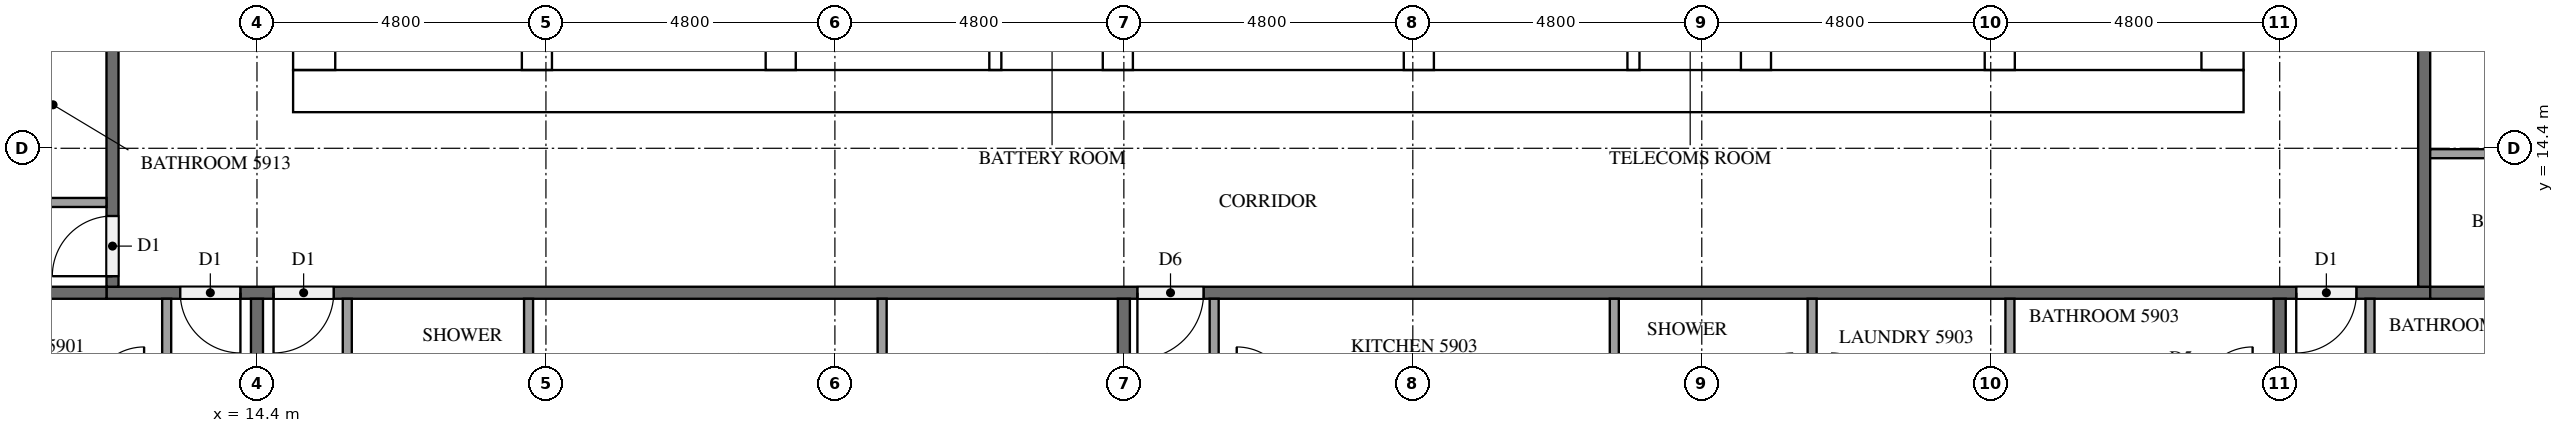
"""IFC4 building model, lengths in metres.
Left out: names, types, materials, properties, quantities, classifications, styles, units other than length and angle.
Written with IfcOpenShell. Run it as: python <this file> out.ifc"""

import sys

from ifc_helpers import new_model, si_unit, direction, frame, frame_2d, origin, place, context, subcontext, project, spatial, rectangle, extrude, element, fill, save


model = new_model("IFC4")
c1 = context("Model", 3, precision=1e-05, world=origin(), true_north=direction((0.0, 1.0)))
c2 = subcontext(c1, "Body", "Model", "MODEL_VIEW")
j1 = project(units=[si_unit("LENGTHUNIT", "METRE"), si_unit("PLANEANGLEUNIT", "RADIAN")], contexts=[c1])
p1 = place(None, origin())
s1 = spatial("IfcSite", under=j1, at=p1, CompositionType="ELEMENT")
p2 = place(p1, origin())
s2 = spatial("IfcBuilding", under=s1, at=p2, CompositionType="ELEMENT")
p3 = place(p2, frame((0.0, 0.0, 226.3)))
s3 = spatial("IfcBuildingStorey", under=s2, at=p3, CompositionType="ELEMENT", Elevation=226.3)
p4 = place(p3, frame((15.0, 15.35, 0.0), z_axis=(0.0, 0.0, 1.0), x_axis=(1.0, 0.0, 0.0)))
e1 = element("IfcWall", 1, at=p4, inside=s3, PredefinedType="SHEAR", context=c2, shape_type="SweptSolid", body=[
    extrude(rectangle(XDim=32.4, YDim=0.7, at=frame_2d((16.2, 0.0))), origin(), (0.0, 0.0, 1.0), 3.2),
])
p5 = place(p4, frame((15.3, 0.0, 0.0)))
e2 = element("IfcOpeningElement", 2, at=p5, cuts=e1, PredefinedType="OPENING", context=c2, shape_type="SweptSolid", body=[
    extrude(rectangle(XDim=1.8, YDim=2.1, at=frame_2d((0.9, 1.05))), frame((0.0, 0.36, 0.0), z_axis=(0.0, -1.0, 0.0), x_axis=(1.0, 0.0, 0.0)), (0.0, 0.0, 1.0), 0.72),
])
p6 = place(p3, frame((15.35, 15.7, 0.0), z_axis=(0.0, 0.0, 1.0), x_axis=(0.0, 1.0, 0.0)))
e3 = element("IfcWall", 3, at=p6, inside=s3, PredefinedType="SHEAR", context=c2, shape_type="SweptSolid", body=[
    extrude(rectangle(XDim=21.4, YDim=0.7, at=frame_2d((10.7, 0.0))), origin(), (0.0, 0.0, 1.0), 3.2),
])
p7 = place(p6, frame((5.06, 0.0, 0.0)))
e4 = element("IfcOpeningElement", 4, at=p7, cuts=e3, PredefinedType="OPENING", context=c2, shape_type="SweptSolid", body=[
    extrude(rectangle(XDim=1.2, YDim=2.1, at=frame_2d((0.6, 1.05))), frame((0.0, 0.36, 0.0), z_axis=(0.0, -1.0, 0.0), x_axis=(1.0, 0.0, 0.0)), (0.0, 0.0, 1.0), 0.72),
])
p8 = place(p3, frame((47.05, 15.7, 0.0), z_axis=(0.0, 0.0, 1.0), x_axis=(0.0, 1.0, 0.0)))
e5 = element("IfcWall", 5, at=p8, inside=s3, PredefinedType="SHEAR", context=c2, shape_type="SweptSolid", body=[
    extrude(rectangle(XDim=21.4, YDim=0.7, at=frame_2d((10.7, 0.0))), origin(), (0.0, 0.0, 1.0), 3.2),
])
p9 = place(p8, frame((10.4, 0.0, 0.0)))
e6 = element("IfcOpeningElement", 6, at=p9, cuts=e5, PredefinedType="OPENING", context=c2, shape_type="SweptSolid", body=[
    extrude(rectangle(XDim=1.2, YDim=2.1, at=frame_2d((0.6, 1.05))), frame((0.0, 0.36, 0.0), z_axis=(0.0, -1.0, 0.0), x_axis=(1.0, 0.0, 0.0)), (0.0, 0.0, 1.0), 0.72),
])
p10 = place(p3, frame((19.05, 15.7, 0.0), z_axis=(0.0, 0.0, 1.0), x_axis=(0.0, 1.0, 0.0)))
e7 = element("IfcWall", 7, at=p10, inside=s3, PredefinedType="SHEAR", context=c2, shape_type="SweptSolid", body=[
    extrude(rectangle(XDim=15.3, YDim=0.5, at=frame_2d((7.65, 0.0))), origin(), (0.0, 0.0, 1.0), 3.2),
])
p11 = place(p10, frame((9.75, 0.0, 0.0)))
e8 = element("IfcOpeningElement", 8, at=p11, cuts=e7, PredefinedType="OPENING", context=c2, shape_type="SweptSolid", body=[
    extrude(rectangle(XDim=1.1, YDim=2.1, at=frame_2d((0.55, 1.05))), frame((0.0, 0.26, 0.0), z_axis=(0.0, -1.0, 0.0), x_axis=(1.0, 0.0, 0.0)), (0.0, 0.0, 1.0), 0.52),
])
p12 = place(p10, frame((13.25, 0.0, 0.0)))
e9 = element("IfcOpeningElement", 9, at=p12, cuts=e7, PredefinedType="OPENING", context=c2, shape_type="SweptSolid", body=[
    extrude(rectangle(XDim=1.1, YDim=2.1, at=frame_2d((0.55, 1.05))), frame((0.0, 0.26, 0.0), z_axis=(0.0, -1.0, 0.0), x_axis=(1.0, 0.0, 0.0)), (0.0, 0.0, 1.0), 0.52),
])
p13 = place(p10, frame((0.5, 0.0, 0.0)))
e10 = element("IfcOpeningElement", 10, at=p13, cuts=e7, PredefinedType="OPENING", context=c2, shape_type="SweptSolid", body=[
    extrude(rectangle(XDim=1.2, YDim=2.1, at=frame_2d((0.6, 1.05))), frame((0.0, 0.26, 0.0), z_axis=(0.0, -1.0, 0.0), x_axis=(1.0, 0.0, 0.0)), (0.0, 0.0, 1.0), 0.52),
])
p14 = place(p3, frame((23.1, 15.7, 0.0), z_axis=(0.0, 0.0, 1.0), x_axis=(0.0, 1.0, 0.0)))
e11 = element("IfcWall", 11, at=p14, inside=s3, PredefinedType="SHEAR", context=c2, shape_type="SweptSolid", body=[
    extrude(rectangle(XDim=21.4, YDim=0.5, at=frame_2d((10.7, 0.0))), origin(), (0.0, 0.0, 1.0), 3.2),
])
p15 = place(p3, frame((39.3, 15.7, 0.0), z_axis=(0.0, 0.0, 1.0), x_axis=(0.0, 1.0, 0.0)))
e12 = element("IfcWall", 12, at=p15, inside=s3, PredefinedType="SHEAR", context=c2, shape_type="SweptSolid", body=[
    extrude(rectangle(XDim=8.55, YDim=0.5, at=frame_2d((4.275, 0.0))), origin(), (0.0, 0.0, 1.0), 3.2),
])
p16 = place(p3, frame((43.35, 15.7, 0.0), z_axis=(0.0, 0.0, 1.0), x_axis=(0.0, 1.0, 0.0)))
e13 = element("IfcWall", 13, at=p16, inside=s3, PredefinedType="SHEAR", context=c2, shape_type="SweptSolid", body=[
    extrude(rectangle(XDim=8.55, YDim=0.5, at=frame_2d((4.275, 0.0))), origin(), (0.0, 0.0, 1.0), 3.2),
])
p17 = place(p16, frame((0.5, 0.0, 0.0)))
e14 = element("IfcOpeningElement", 14, at=p17, cuts=e13, PredefinedType="OPENING", context=c2, shape_type="SweptSolid", body=[
    extrude(rectangle(XDim=1.2, YDim=2.1, at=frame_2d((0.6, 1.05))), frame((0.0, 0.26, 0.0), z_axis=(0.0, -1.0, 0.0), x_axis=(1.0, 0.0, 0.0)), (0.0, 0.0, 1.0), 0.52),
])
for number, where, z_axis, x_axis in (
    (15, (28.7, 15.7, 0.0), (0.0, 0.0, 1.0), (0.0, 1.0, 0.0)),
    (16, (33.7, 15.7, 0.0), (0.0, 0.0, 1.0), (0.0, 1.0, 0.0)),
):
    element("IfcWall", number, at=place(p3, frame(where, z_axis=z_axis, x_axis=x_axis)), inside=s3, PredefinedType="SHEAR", context=c2, shape_type="SweptSolid", body=[
        extrude(rectangle(XDim=2.8, YDim=0.5, at=frame_2d((1.4, 0.0))), origin(), (0.0, 0.0, 1.0), 3.2),
    ])
for number, where, z_axis, x_axis in (
    (17, (26.665, 15.7, 0.0), (0.0, 0.0, 1.0), (0.0, 1.0, 0.0)),
    (18, (37.265, 15.7, 0.0), (0.0, 0.0, 1.0), (0.0, 1.0, 0.0)),
):
    element("IfcWall", number, at=place(p3, frame(where, z_axis=z_axis, x_axis=x_axis)), inside=s3, PredefinedType="PARTITIONING", context=c2, shape_type="SweptSolid", body=[
        extrude(rectangle(XDim=2.8, YDim=0.2, at=frame_2d((1.4, 0.0))), origin(), (0.0, 0.0, 1.0), 3.2),
    ])
p18 = place(p3, frame((50.5, 12.0, 0.0), z_axis=(0.0, 0.0, 1.0), x_axis=(-1.0, 0.0, 0.0)))
e19 = element("IfcWall", 19, at=p18, inside=s3, PredefinedType="PARTITIONING", context=c2, shape_type="SweptSolid", body=[
    extrude(rectangle(XDim=38.6, YDim=0.2, at=frame_2d((19.3, 0.0))), origin(), (0.0, 0.0, 1.0), 3.2),
])
p19 = place(p18, frame((36.375, 0.0, 0.0)))
e20 = element("IfcOpeningElement", 20, at=p19, cuts=e19, PredefinedType="OPENING", context=c2, shape_type="SweptSolid", body=[
    extrude(rectangle(XDim=1.0, YDim=2.1, at=frame_2d((0.5, 1.05))), frame((0.0, 0.11, 0.0), z_axis=(0.0, -1.0, 0.0), x_axis=(1.0, 0.0, 0.0)), (0.0, 0.0, 1.0), 0.22),
])
p20 = place(p18, frame((34.825, 0.0, 0.0)))
e21 = element("IfcOpeningElement", 21, at=p20, cuts=e19, PredefinedType="OPENING", context=c2, shape_type="SweptSolid", body=[
    extrude(rectangle(XDim=1.0, YDim=2.1, at=frame_2d((0.5, 1.05))), frame((0.0, 0.11, 0.0), z_axis=(0.0, -1.0, 0.0), x_axis=(1.0, 0.0, 0.0)), (0.0, 0.0, 1.0), 0.22),
])
p21 = place(p18, frame((20.375, 0.0, 0.0)))
e22 = element("IfcOpeningElement", 22, at=p21, cuts=e19, PredefinedType="OPENING", context=c2, shape_type="SweptSolid", body=[
    extrude(rectangle(XDim=1.1, YDim=2.1, at=frame_2d((0.55, 1.05))), frame((0.0, 0.11, 0.0), z_axis=(0.0, -1.0, 0.0), x_axis=(1.0, 0.0, 0.0)), (0.0, 0.0, 1.0), 0.22),
])
p22 = place(p18, frame((1.225, 0.0, 0.0)))
e23 = element("IfcOpeningElement", 23, at=p22, cuts=e19, PredefinedType="OPENING", context=c2, shape_type="SweptSolid", body=[
    extrude(rectangle(XDim=1.0, YDim=2.1, at=frame_2d((0.5, 1.05))), frame((0.0, 0.11, 0.0), z_axis=(0.0, -1.0, 0.0), x_axis=(1.0, 0.0, 0.0)), (0.0, 0.0, 1.0), 0.22),
])
p23 = place(p3, frame((50.4, 40.7, 0.0), z_axis=(0.0, 0.0, 1.0), x_axis=(0.0, -1.0, 0.0)))
e24 = element("IfcWall", 24, at=p23, inside=s3, PredefinedType="PARTITIONING", context=c2, shape_type="SweptSolid", body=[
    extrude(rectangle(XDim=28.6, YDim=0.2, at=frame_2d((14.3, 0.0))), origin(), (0.0, 0.0, 1.0), 3.2),
])
p24 = place(p23, frame((21.775, 0.0, 0.0)))
e25 = element("IfcOpeningElement", 25, at=p24, cuts=e24, PredefinedType="OPENING", context=c2, shape_type="SweptSolid", body=[
    extrude(rectangle(XDim=1.0, YDim=2.1, at=frame_2d((0.5, 1.05))), frame((0.0, 0.11, 0.0), z_axis=(0.0, -1.0, 0.0), x_axis=(1.0, 0.0, 0.0)), (0.0, 0.0, 1.0), 0.22),
])
p25 = place(p23, frame((7.375, 0.0, 0.0)))
e26 = element("IfcOpeningElement", 26, at=p25, cuts=e24, PredefinedType="OPENING", context=c2, shape_type="SweptSolid", body=[
    extrude(rectangle(XDim=1.0, YDim=2.1, at=frame_2d((0.5, 1.05))), frame((0.0, 0.11, 0.0), z_axis=(0.0, -1.0, 0.0), x_axis=(1.0, 0.0, 0.0)), (0.0, 0.0, 1.0), 0.22),
])
p26 = place(p23, frame((0.175, 0.0, 0.0)))
e27 = element("IfcOpeningElement", 27, at=p26, cuts=e24, PredefinedType="OPENING", context=c2, shape_type="SweptSolid", body=[
    extrude(rectangle(XDim=1.0, YDim=2.1, at=frame_2d((0.5, 1.05))), frame((0.0, 0.11, 0.0), z_axis=(0.0, -1.0, 0.0), x_axis=(1.0, 0.0, 0.0)), (0.0, 0.0, 1.0), 0.22),
])
p27 = place(p3, frame((12.0, 12.1, 0.0), z_axis=(0.0, 0.0, 1.0), x_axis=(0.0, 1.0, 0.0)))
e28 = element("IfcWall", 28, at=p27, inside=s3, PredefinedType="PARTITIONING", context=c2, shape_type="SweptSolid", body=[
    extrude(rectangle(XDim=28.6, YDim=0.2, at=frame_2d((14.3, 0.0))), origin(), (0.0, 0.0, 1.0), 3.2),
])
p28 = place(p27, frame((9.725, 0.0, 0.0)))
e29 = element("IfcOpeningElement", 29, at=p28, cuts=e28, PredefinedType="OPENING", context=c2, shape_type="SweptSolid", body=[
    extrude(rectangle(XDim=1.1, YDim=2.1, at=frame_2d((0.55, 1.05))), frame((0.0, 0.11, 0.0), z_axis=(0.0, -1.0, 0.0), x_axis=(1.0, 0.0, 0.0)), (0.0, 0.0, 1.0), 0.22),
])
p29 = place(p27, frame((0.175, 0.0, 0.0)))
e30 = element("IfcOpeningElement", 30, at=p29, cuts=e28, PredefinedType="OPENING", context=c2, shape_type="SweptSolid", body=[
    extrude(rectangle(XDim=1.0, YDim=2.1, at=frame_2d((0.5, 1.05))), frame((0.0, 0.11, 0.0), z_axis=(0.0, -1.0, 0.0), x_axis=(1.0, 0.0, 0.0)), (0.0, 0.0, 1.0), 0.22),
])
for number, where, z_axis, x_axis in (
    (31, (14.4, 11.9, 0.0), (0.0, 0.0, 1.0), (0.0, -1.0, 0.0)),
    (32, (4.9, 12.0, 0.0), (0.0, 0.0, 1.0), (1.0, 0.0, 0.0)),
):
    element("IfcWall", number, at=place(p3, frame(where, z_axis=z_axis, x_axis=x_axis)), inside=s3, PredefinedType="PARTITIONING", context=c2, shape_type="SweptSolid", body=[
        extrude(rectangle(XDim=7.0, YDim=0.2, at=frame_2d((3.5, 0.0))), origin(), (0.0, 0.0, 1.0), 3.2),
    ])
for number, where, z_axis, x_axis in (
    (33, (28.8, 11.9, 0.0), (0.0, 0.0, 1.0), (0.0, -1.0, 0.0)),
    (34, (48.0, 11.9, 0.0), (0.0, 0.0, 1.0), (0.0, -1.0, 0.0)),
):
    element("IfcWall", number, at=place(p3, frame(where, z_axis=z_axis, x_axis=x_axis)), inside=s3, PredefinedType="PARTITIONING", context=c2, shape_type="SweptSolid", body=[
        extrude(rectangle(XDim=6.775, YDim=0.2, at=frame_2d((3.387, 0.0))), origin(), (0.0, 0.0, 1.0), 3.2),
    ])
p30 = place(p3, frame((50.5, 12.0, 0.0), z_axis=(0.0, 0.0, 1.0), x_axis=(1.0, 0.0, 0.0)))
e35 = element("IfcWall", 35, at=p30, inside=s3, PredefinedType="PARTITIONING", context=c2, shape_type="SweptSolid", body=[
    extrude(rectangle(XDim=11.8, YDim=0.2, at=frame_2d((5.9, 0.0))), origin(), (0.0, 0.0, 1.0), 3.2),
])
p31 = place(p3, frame((12.9, 11.9, 0.0), z_axis=(0.0, 0.0, 1.0), x_axis=(0.0, -1.0, 0.0)))
e36 = element("IfcWall", 36, at=p31, inside=s3, PredefinedType="PARTITIONING", context=c2, shape_type="SweptSolid", body=[
    extrude(rectangle(XDim=1.775, YDim=0.15, at=frame_2d((0.887, 0.0))), origin(), (0.0, 0.0, 1.0), 3.2),
])
for number, where, z_axis, x_axis in (
    (37, (18.912, 11.9, 0.0), (0.0, 0.0, 1.0), (0.0, -1.0, 0.0)),
    (38, (24.785, 11.9, 0.0), (0.0, 0.0, 1.0), (0.0, -1.0, 0.0)),
):
    element("IfcWall", number, at=place(p3, frame(where, z_axis=z_axis, x_axis=x_axis)), inside=s3, PredefinedType="PARTITIONING", context=c2, shape_type="SweptSolid", body=[
        extrude(rectangle(XDim=2.075, YDim=0.15, at=frame_2d((1.038, 0.0))), origin(), (0.0, 0.0, 1.0), 3.2),
    ])
p32 = place(p3, frame((15.9, 11.9, 0.0), z_axis=(0.0, 0.0, 1.0), x_axis=(0.0, -1.0, 0.0)))
e39 = element("IfcWall", 39, at=p32, inside=s3, PredefinedType="PARTITIONING", context=c2, shape_type="SweptSolid", body=[
    extrude(rectangle(XDim=2.225, YDim=0.15, at=frame_2d((1.112, 0.0))), origin(), (0.0, 0.0, 1.0), 3.2),
])
for number, where, z_axis, x_axis in (
    (40, (36.947, 11.9, 0.0), (0.0, 0.0, 1.0), (0.0, -1.0, 0.0)),
    (41, (40.233, 11.9, 0.0), (0.0, 0.0, 1.0), (0.0, -1.0, 0.0)),
    (42, (43.519, 11.9, 0.0), (0.0, 0.0, 1.0), (0.0, -1.0, 0.0)),
):
    element("IfcWall", number, at=place(p3, frame(where, z_axis=z_axis, x_axis=x_axis)), inside=s3, PredefinedType="PARTITIONING", context=c2, shape_type="SweptSolid", body=[
        extrude(rectangle(XDim=1.625, YDim=0.15, at=frame_2d((0.812, 0.0))), origin(), (0.0, 0.0, 1.0), 3.2),
    ])
p33 = place(p3, frame((30.3, 11.9, 0.0), z_axis=(0.0, 0.0, 1.0), x_axis=(0.0, -1.0, 0.0)))
e43 = element("IfcWall", 43, at=p33, inside=s3, PredefinedType="PARTITIONING", context=c2, shape_type="SweptSolid", body=[
    extrude(rectangle(XDim=1.775, YDim=0.15, at=frame_2d((0.887, 0.0))), origin(), (0.0, 0.0, 1.0), 3.2),
])
p34 = place(p3, frame((49.5, 11.9, 0.0), z_axis=(0.0, 0.0, 1.0), x_axis=(0.0, -1.0, 0.0)))
e44 = element("IfcWall", 44, at=p34, inside=s3, PredefinedType="PARTITIONING", context=c2, shape_type="SweptSolid", body=[
    extrude(rectangle(XDim=1.925, YDim=0.15, at=frame_2d((0.962, 0.0))), origin(), (0.0, 0.0, 1.0), 3.2),
])
p35 = place(p3, frame((50.5, 14.31, 0.0), z_axis=(0.0, 0.0, 1.0), x_axis=(1.0, 0.0, 0.0)))
e45 = element("IfcWall", 45, at=p35, inside=s3, PredefinedType="PARTITIONING", context=c2, shape_type="SweptSolid", body=[
    extrude(rectangle(XDim=3.875, YDim=0.15, at=frame_2d((1.938, 0.0))), origin(), (0.0, 0.0, 1.0), 3.2),
])
p36 = place(p3, frame((11.9, 13.5, 0.0), z_axis=(0.0, 0.0, 1.0), x_axis=(-1.0, 0.0, 0.0)))
e46 = element("IfcWall", 46, at=p36, inside=s3, PredefinedType="PARTITIONING", context=c2, shape_type="SweptSolid", body=[
    extrude(rectangle(XDim=1.925, YDim=0.15, at=frame_2d((0.962, 0.0))), origin(), (0.0, 0.0, 1.0), 3.2),
])
p37 = place(p5, frame((1.8, 0.0, 0.0), z_axis=(0.0, 0.0, 1.0), x_axis=(-1.0, 0.0, 0.0)))
e47 = element("IfcDoor", 47, at=p37, inside=s3, OperationType="DOUBLE_DOOR_SINGLE_SWING", PredefinedType="DOOR", context=c2, shape_type="SweptSolid", body=[
    extrude(rectangle(XDim=1.8, YDim=2.1, at=frame_2d((0.9, 1.05))), frame((0.0, 0.025, 0.0), z_axis=(0.0, -1.0, 0.0), x_axis=(1.0, 0.0, 0.0)), (0.0, 0.0, 1.0), 0.05),
])
fill(e2, e47)
p38 = place(p19, origin())
e48 = element("IfcDoor", 48, at=p38, inside=s3, OperationType="SINGLE_SWING_LEFT", PredefinedType="DOOR", context=c2, shape_type="SweptSolid", body=[
    extrude(rectangle(XDim=1.0, YDim=2.1, at=frame_2d((0.5, 1.05))), frame((0.0, 0.025, 0.0), z_axis=(0.0, -1.0, 0.0), x_axis=(1.0, 0.0, 0.0)), (0.0, 0.0, 1.0), 0.05),
])
fill(e20, e48)
p39 = place(p20, origin())
e49 = element("IfcDoor", 49, at=p39, inside=s3, OperationType="SINGLE_SWING_RIGHT", PredefinedType="DOOR", context=c2, shape_type="SweptSolid", body=[
    extrude(rectangle(XDim=1.0, YDim=2.1, at=frame_2d((0.5, 1.05))), frame((0.0, 0.025, 0.0), z_axis=(0.0, -1.0, 0.0), x_axis=(1.0, 0.0, 0.0)), (0.0, 0.0, 1.0), 0.05),
])
fill(e21, e49)
p40 = place(p21, origin())
e50 = element("IfcDoor", 50, at=p40, inside=s3, OperationType="SINGLE_SWING_RIGHT", PredefinedType="DOOR", context=c2, shape_type="SweptSolid", body=[
    extrude(rectangle(XDim=1.1, YDim=2.1, at=frame_2d((0.55, 1.05))), frame((0.0, 0.025, 0.0), z_axis=(0.0, -1.0, 0.0), x_axis=(1.0, 0.0, 0.0)), (0.0, 0.0, 1.0), 0.05),
])
fill(e22, e50)
p41 = place(p22, origin())
e51 = element("IfcDoor", 51, at=p41, inside=s3, OperationType="SINGLE_SWING_RIGHT", PredefinedType="DOOR", context=c2, shape_type="SweptSolid", body=[
    extrude(rectangle(XDim=1.0, YDim=2.1, at=frame_2d((0.5, 1.05))), frame((0.0, 0.025, 0.0), z_axis=(0.0, -1.0, 0.0), x_axis=(1.0, 0.0, 0.0)), (0.0, 0.0, 1.0), 0.05),
])
fill(e23, e51)
p42 = place(p29, origin())
e52 = element("IfcDoor", 52, at=p42, inside=s3, OperationType="SINGLE_SWING_LEFT", PredefinedType="DOOR", context=c2, shape_type="SweptSolid", body=[
    extrude(rectangle(XDim=1.0, YDim=2.1, at=frame_2d((0.5, 1.05))), frame((0.0, 0.025, 0.0), z_axis=(0.0, -1.0, 0.0), x_axis=(1.0, 0.0, 0.0)), (0.0, 0.0, 1.0), 0.05),
])
fill(e30, e52)
save(model, sys.argv[1])
